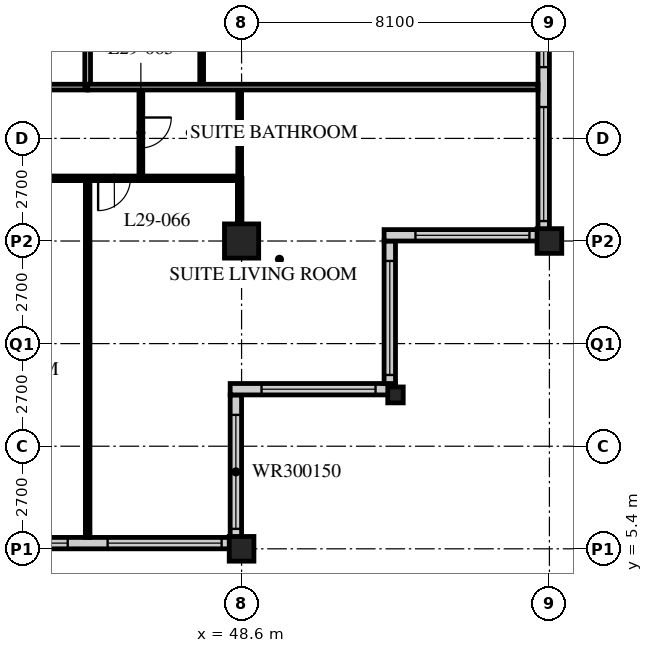
"""IFC4 building model, lengths in metres.
Left out: names, types, materials, properties, quantities, classifications, styles, units other than length and angle.
Written with IfcOpenShell. Run it as: python <this file> out.ifc"""

import sys

from ifc_helpers import new_model, si_unit, direction, frame, frame_2d, origin, origin_2d, place, context, subcontext, project, spatial, rectangle, hollow_rectangle, i_section, extrude, element, fill, save


model = new_model("IFC4")
c1 = context("Model", 3, precision=1e-05, world=origin(), true_north=direction((0.0, 1.0)))
c2 = subcontext(c1, "Body", "Model", "MODEL_VIEW")
j1 = project(units=[si_unit("LENGTHUNIT", "METRE"), si_unit("PLANEANGLEUNIT", "RADIAN")], contexts=[c1])
p1 = place(None, origin())
s1 = spatial("IfcSite", under=j1, at=p1, CompositionType="ELEMENT")
p2 = place(p1, origin())
s2 = spatial("IfcBuilding", under=s1, at=p2, CompositionType="ELEMENT")
p3 = place(p2, frame((0.0, 0.0, 117.0)))
s3 = spatial("IfcBuildingStorey", under=s2, at=p3, CompositionType="ELEMENT", Elevation=117.0)
p4 = place(p3, frame((48.6, 5.4, 0.0), z_axis=(0.0, 0.0, 1.0), x_axis=(1.0, 0.0, 0.0)))
e1 = element("IfcColumn", 1, at=p4, inside=s3, PredefinedType="COLUMN", context=c2, shape_type="SweptSolid", body=[
    extrude(hollow_rectangle(XDim=0.65, YDim=0.65, WallThickness=0.055, at=origin_2d()), origin(), (0.0, 0.0, 1.0), 3.4),
])
p5 = place(p3, frame((48.6, 13.5, 0.0), z_axis=(0.0, 0.0, 1.0), x_axis=(1.0, 0.0, 0.0)))
e2 = element("IfcColumn", 2, at=p5, inside=s3, PredefinedType="COLUMN", context=c2, shape_type="SweptSolid", body=[
    extrude(hollow_rectangle(XDim=0.9, YDim=0.9, WallThickness=0.09, at=origin_2d()), origin(), (0.0, 0.0, 1.0), 3.4),
])
p6 = place(p3, frame((52.65, 9.45, 0.0), z_axis=(0.0, 0.0, 1.0), x_axis=(1.0, 0.0, 0.0)))
e3 = element("IfcColumn", 3, at=p6, inside=s3, PredefinedType="COLUMN", context=c2, shape_type="SweptSolid", body=[
    extrude(i_section(OverallWidth=0.407, OverallDepth=0.419, WebThickness=0.031, FlangeThickness=0.049, FilletRadius=0.015, at=origin_2d()), origin(), (0.0, 0.0, 1.0), 3.4),
])
p7 = place(p3, frame((56.7, 13.5, 0.0), z_axis=(0.0, 0.0, 1.0), x_axis=(1.0, 0.0, 0.0)))
e4 = element("IfcColumn", 4, at=p7, inside=s3, PredefinedType="COLUMN", context=c2, shape_type="SweptSolid", body=[
    extrude(hollow_rectangle(XDim=0.65, YDim=0.65, WallThickness=0.055, at=origin_2d()), origin(), (0.0, 0.0, 1.0), 3.4),
])
p8 = place(p3, frame((8.4, 5.55, 0.0), z_axis=(0.0, 0.0, 1.0), x_axis=(1.0, 0.0, 0.0)))
e5 = element("IfcWall", 5, at=p8, inside=s3, PredefinedType="SOLIDWALL", context=c2, shape_type="SweptSolid", body=[
    extrude(rectangle(XDim=40.2, YDim=0.3, at=frame_2d((20.1, 0.0))), origin(), (0.0, 0.0, 1.0), 3.19),
])
p9 = place(p8, frame((0.225, 0.0, 0.9)))
e6 = element("IfcOpeningElement", 6, at=p9, cuts=e5, PredefinedType="OPENING", context=c2, shape_type="SweptSolid", body=[
    extrude(rectangle(XDim=3.0, YDim=2.0, at=frame_2d((1.5, 1.0))), frame((0.0, 0.16, 0.0), z_axis=(0.0, -1.0, 0.0), x_axis=(1.0, 0.0, 0.0)), (0.0, 0.0, 1.0), 0.32),
])
p10 = place(p8, frame((4.275, 0.0, 0.9)))
e7 = element("IfcOpeningElement", 7, at=p10, cuts=e5, PredefinedType="OPENING", context=c2, shape_type="SweptSolid", body=[
    extrude(rectangle(XDim=3.0, YDim=2.0, at=frame_2d((1.5, 1.0))), frame((0.0, 0.16, 0.0), z_axis=(0.0, -1.0, 0.0), x_axis=(1.0, 0.0, 0.0)), (0.0, 0.0, 1.0), 0.32),
])
p11 = place(p8, frame((8.325, 0.0, 0.9)))
e8 = element("IfcOpeningElement", 8, at=p11, cuts=e5, PredefinedType="OPENING", context=c2, shape_type="SweptSolid", body=[
    extrude(rectangle(XDim=3.0, YDim=2.0, at=frame_2d((1.5, 1.0))), frame((0.0, 0.16, 0.0), z_axis=(0.0, -1.0, 0.0), x_axis=(1.0, 0.0, 0.0)), (0.0, 0.0, 1.0), 0.32),
])
p12 = place(p8, frame((12.375, 0.0, 0.9)))
e9 = element("IfcOpeningElement", 9, at=p12, cuts=e5, PredefinedType="OPENING", context=c2, shape_type="SweptSolid", body=[
    extrude(rectangle(XDim=3.0, YDim=2.0, at=frame_2d((1.5, 1.0))), frame((0.0, 0.16, 0.0), z_axis=(0.0, -1.0, 0.0), x_axis=(1.0, 0.0, 0.0)), (0.0, 0.0, 1.0), 0.32),
])
p13 = place(p8, frame((16.425, 0.0, 0.9)))
e10 = element("IfcOpeningElement", 10, at=p13, cuts=e5, PredefinedType="OPENING", context=c2, shape_type="SweptSolid", body=[
    extrude(rectangle(XDim=3.0, YDim=2.0, at=frame_2d((1.5, 1.0))), frame((0.0, 0.16, 0.0), z_axis=(0.0, -1.0, 0.0), x_axis=(1.0, 0.0, 0.0)), (0.0, 0.0, 1.0), 0.32),
])
p14 = place(p8, frame((20.475, 0.0, 0.9)))
e11 = element("IfcOpeningElement", 11, at=p14, cuts=e5, PredefinedType="OPENING", context=c2, shape_type="SweptSolid", body=[
    extrude(rectangle(XDim=3.0, YDim=2.0, at=frame_2d((1.5, 1.0))), frame((0.0, 0.16, 0.0), z_axis=(0.0, -1.0, 0.0), x_axis=(1.0, 0.0, 0.0)), (0.0, 0.0, 1.0), 0.32),
])
p15 = place(p8, frame((24.525, 0.0, 0.9)))
e12 = element("IfcOpeningElement", 12, at=p15, cuts=e5, PredefinedType="OPENING", context=c2, shape_type="SweptSolid", body=[
    extrude(rectangle(XDim=3.0, YDim=2.0, at=frame_2d((1.5, 1.0))), frame((0.0, 0.16, 0.0), z_axis=(0.0, -1.0, 0.0), x_axis=(1.0, 0.0, 0.0)), (0.0, 0.0, 1.0), 0.32),
])
p16 = place(p8, frame((28.575, 0.0, 0.9)))
e13 = element("IfcOpeningElement", 13, at=p16, cuts=e5, PredefinedType="OPENING", context=c2, shape_type="SweptSolid", body=[
    extrude(rectangle(XDim=3.0, YDim=2.0, at=frame_2d((1.5, 1.0))), frame((0.0, 0.16, 0.0), z_axis=(0.0, -1.0, 0.0), x_axis=(1.0, 0.0, 0.0)), (0.0, 0.0, 1.0), 0.32),
])
p17 = place(p8, frame((32.625, 0.0, 0.9)))
e14 = element("IfcOpeningElement", 14, at=p17, cuts=e5, PredefinedType="OPENING", context=c2, shape_type="SweptSolid", body=[
    extrude(rectangle(XDim=3.0, YDim=2.0, at=frame_2d((1.5, 1.0))), frame((0.0, 0.16, 0.0), z_axis=(0.0, -1.0, 0.0), x_axis=(1.0, 0.0, 0.0)), (0.0, 0.0, 1.0), 0.32),
])
p18 = place(p8, frame((36.675, 0.0, 0.9)))
e15 = element("IfcOpeningElement", 15, at=p18, cuts=e5, PredefinedType="OPENING", context=c2, shape_type="SweptSolid", body=[
    extrude(rectangle(XDim=3.0, YDim=2.0, at=frame_2d((1.5, 1.0))), frame((0.0, 0.16, 0.0), z_axis=(0.0, -1.0, 0.0), x_axis=(1.0, 0.0, 0.0)), (0.0, 0.0, 1.0), 0.32),
])
p19 = place(p3, frame((48.45, 5.7, 0.0), z_axis=(0.0, 0.0, 1.0), x_axis=(0.0, 1.0, 0.0)))
e16 = element("IfcWall", 16, at=p19, inside=s3, PredefinedType="SOLIDWALL", context=c2, shape_type="SweptSolid", body=[
    extrude(rectangle(XDim=3.75, YDim=0.3, at=frame_2d((1.875, 0.0))), origin(), (0.0, 0.0, 1.0), 3.19),
])
p20 = place(p19, frame((0.225, 0.0, 0.9)))
e17 = element("IfcOpeningElement", 17, at=p20, cuts=e16, PredefinedType="OPENING", context=c2, shape_type="SweptSolid", body=[
    extrude(rectangle(XDim=3.0, YDim=1.5, at=frame_2d((1.5, 0.75))), frame((0.0, 0.16, 0.0), z_axis=(0.0, -1.0, 0.0), x_axis=(1.0, 0.0, 0.0)), (0.0, 0.0, 1.0), 0.32),
])
p21 = place(p3, frame((48.3, 9.6, 0.0), z_axis=(0.0, 0.0, 1.0), x_axis=(1.0, 0.0, 0.0)))
e18 = element("IfcWall", 18, at=p21, inside=s3, PredefinedType="SOLIDWALL", context=c2, shape_type="SweptSolid", body=[
    extrude(rectangle(XDim=4.35, YDim=0.3, at=frame_2d((2.175, 0.0))), origin(), (0.0, 0.0, 1.0), 3.19),
])
p22 = place(p21, frame((0.825, 0.0, 0.9)))
e19 = element("IfcOpeningElement", 19, at=p22, cuts=e18, PredefinedType="OPENING", context=c2, shape_type="SweptSolid", body=[
    extrude(rectangle(XDim=3.0, YDim=1.5, at=frame_2d((1.5, 0.75))), frame((0.0, 0.16, 0.0), z_axis=(0.0, -1.0, 0.0), x_axis=(1.0, 0.0, 0.0)), (0.0, 0.0, 1.0), 0.32),
])
p23 = place(p3, frame((52.5, 9.75, 0.0), z_axis=(0.0, 0.0, 1.0), x_axis=(0.0, 1.0, 0.0)))
e20 = element("IfcWall", 20, at=p23, inside=s3, PredefinedType="SOLIDWALL", context=c2, shape_type="SweptSolid", body=[
    extrude(rectangle(XDim=3.75, YDim=0.3, at=frame_2d((1.875, 0.0))), origin(), (0.0, 0.0, 1.0), 3.19),
])
p24 = place(p23, frame((0.225, 0.0, 0.9)))
e21 = element("IfcOpeningElement", 21, at=p24, cuts=e20, PredefinedType="OPENING", context=c2, shape_type="SweptSolid", body=[
    extrude(rectangle(XDim=3.0, YDim=1.5, at=frame_2d((1.5, 0.75))), frame((0.0, 0.16, 0.0), z_axis=(0.0, -1.0, 0.0), x_axis=(1.0, 0.0, 0.0)), (0.0, 0.0, 1.0), 0.32),
])
p25 = place(p3, frame((52.35, 13.65, 0.0), z_axis=(0.0, 0.0, 1.0), x_axis=(1.0, 0.0, 0.0)))
e22 = element("IfcWall", 22, at=p25, inside=s3, PredefinedType="SOLIDWALL", context=c2, shape_type="SweptSolid", body=[
    extrude(rectangle(XDim=4.35, YDim=0.3, at=frame_2d((2.175, 0.0))), origin(), (0.0, 0.0, 1.0), 3.19),
])
p26 = place(p25, frame((0.825, 0.0, 0.9)))
e23 = element("IfcOpeningElement", 23, at=p26, cuts=e22, PredefinedType="OPENING", context=c2, shape_type="SweptSolid", body=[
    extrude(rectangle(XDim=3.0, YDim=1.5, at=frame_2d((1.5, 0.75))), frame((0.0, 0.16, 0.0), z_axis=(0.0, -1.0, 0.0), x_axis=(1.0, 0.0, 0.0)), (0.0, 0.0, 1.0), 0.32),
])
p27 = place(p3, frame((56.55, 13.8, 0.0), z_axis=(0.0, 0.0, 1.0), x_axis=(0.0, 1.0, 0.0)))
e24 = element("IfcWall", 24, at=p27, inside=s3, PredefinedType="SOLIDWALL", context=c2, shape_type="SweptSolid", body=[
    extrude(rectangle(XDim=32.1, YDim=0.3, at=frame_2d((16.05, 0.0))), origin(), (0.0, 0.0, 1.0), 3.19),
])
p28 = place(p27, frame((0.225, 0.0, 0.9)))
e25 = element("IfcOpeningElement", 25, at=p28, cuts=e24, PredefinedType="OPENING", context=c2, shape_type="SweptSolid", body=[
    extrude(rectangle(XDim=3.0, YDim=2.0, at=frame_2d((1.5, 1.0))), frame((0.0, 0.16, 0.0), z_axis=(0.0, -1.0, 0.0), x_axis=(1.0, 0.0, 0.0)), (0.0, 0.0, 1.0), 0.32),
])
p29 = place(p27, frame((4.275, 0.0, 0.9)))
e26 = element("IfcOpeningElement", 26, at=p29, cuts=e24, PredefinedType="OPENING", context=c2, shape_type="SweptSolid", body=[
    extrude(rectangle(XDim=3.0, YDim=2.0, at=frame_2d((1.5, 1.0))), frame((0.0, 0.16, 0.0), z_axis=(0.0, -1.0, 0.0), x_axis=(1.0, 0.0, 0.0)), (0.0, 0.0, 1.0), 0.32),
])
p30 = place(p27, frame((8.325, 0.0, 0.9)))
e27 = element("IfcOpeningElement", 27, at=p30, cuts=e24, PredefinedType="OPENING", context=c2, shape_type="SweptSolid", body=[
    extrude(rectangle(XDim=3.0, YDim=2.0, at=frame_2d((1.5, 1.0))), frame((0.0, 0.16, 0.0), z_axis=(0.0, -1.0, 0.0), x_axis=(1.0, 0.0, 0.0)), (0.0, 0.0, 1.0), 0.32),
])
p31 = place(p27, frame((12.375, 0.0, 0.9)))
e28 = element("IfcOpeningElement", 28, at=p31, cuts=e24, PredefinedType="OPENING", context=c2, shape_type="SweptSolid", body=[
    extrude(rectangle(XDim=3.0, YDim=2.0, at=frame_2d((1.5, 1.0))), frame((0.0, 0.16, 0.0), z_axis=(0.0, -1.0, 0.0), x_axis=(1.0, 0.0, 0.0)), (0.0, 0.0, 1.0), 0.32),
])
p32 = place(p27, frame((16.425, 0.0, 0.9)))
e29 = element("IfcOpeningElement", 29, at=p32, cuts=e24, PredefinedType="OPENING", context=c2, shape_type="SweptSolid", body=[
    extrude(rectangle(XDim=3.0, YDim=2.0, at=frame_2d((1.5, 1.0))), frame((0.0, 0.16, 0.0), z_axis=(0.0, -1.0, 0.0), x_axis=(1.0, 0.0, 0.0)), (0.0, 0.0, 1.0), 0.32),
])
p33 = place(p27, frame((20.475, 0.0, 0.9)))
e30 = element("IfcOpeningElement", 30, at=p33, cuts=e24, PredefinedType="OPENING", context=c2, shape_type="SweptSolid", body=[
    extrude(rectangle(XDim=3.0, YDim=2.0, at=frame_2d((1.5, 1.0))), frame((0.0, 0.16, 0.0), z_axis=(0.0, -1.0, 0.0), x_axis=(1.0, 0.0, 0.0)), (0.0, 0.0, 1.0), 0.32),
])
p34 = place(p27, frame((24.525, 0.0, 0.9)))
e31 = element("IfcOpeningElement", 31, at=p34, cuts=e24, PredefinedType="OPENING", context=c2, shape_type="SweptSolid", body=[
    extrude(rectangle(XDim=3.0, YDim=2.0, at=frame_2d((1.5, 1.0))), frame((0.0, 0.16, 0.0), z_axis=(0.0, -1.0, 0.0), x_axis=(1.0, 0.0, 0.0)), (0.0, 0.0, 1.0), 0.32),
])
p35 = place(p27, frame((28.575, 0.0, 0.9)))
e32 = element("IfcOpeningElement", 32, at=p35, cuts=e24, PredefinedType="OPENING", context=c2, shape_type="SweptSolid", body=[
    extrude(rectangle(XDim=3.0, YDim=2.0, at=frame_2d((1.5, 1.0))), frame((0.0, 0.16, 0.0), z_axis=(0.0, -1.0, 0.0), x_axis=(1.0, 0.0, 0.0)), (0.0, 0.0, 1.0), 0.32),
])
p36 = place(p3, frame((12.15, 17.55, 0.0), z_axis=(0.0, 0.0, 1.0), x_axis=(1.0, 0.0, 0.0)))
e33 = element("IfcWall", 33, at=p36, inside=s3, PredefinedType="PARTITIONING", context=c2, shape_type="SweptSolid", body=[
    extrude(rectangle(XDim=32.4, YDim=0.15, at=frame_2d((16.2, 0.0))), origin(), (0.0, 0.0, 1.0), 3.19),
])
p37 = place(p36, frame((5.95, 0.0, 0.0)))
e34 = element("IfcOpeningElement", 34, at=p37, cuts=e33, PredefinedType="OPENING", context=c2, shape_type="SweptSolid", body=[
    extrude(rectangle(XDim=1.0, YDim=2.1, at=frame_2d((0.5, 1.05))), frame((0.0, 0.085, 0.0), z_axis=(0.0, -1.0, 0.0), x_axis=(1.0, 0.0, 0.0)), (0.0, 0.0, 1.0), 0.17),
])
p38 = place(p36, frame((17.725, 0.0, 0.0)))
e35 = element("IfcOpeningElement", 35, at=p38, cuts=e33, PredefinedType="OPENING", context=c2, shape_type="SweptSolid", body=[
    extrude(rectangle(XDim=1.0, YDim=2.1, at=frame_2d((0.5, 1.05))), frame((0.0, 0.085, 0.0), z_axis=(0.0, -1.0, 0.0), x_axis=(1.0, 0.0, 0.0)), (0.0, 0.0, 1.0), 0.17),
])
p39 = place(p36, frame((26.75, 0.0, 0.0)))
e36 = element("IfcOpeningElement", 36, at=p39, cuts=e33, PredefinedType="OPENING", context=c2, shape_type="SweptSolid", body=[
    extrude(rectangle(XDim=1.0, YDim=2.1, at=frame_2d((0.5, 1.05))), frame((0.0, 0.085, 0.0), z_axis=(0.0, -1.0, 0.0), x_axis=(1.0, 0.0, 0.0)), (0.0, 0.0, 1.0), 0.17),
])
p40 = place(p36, frame((1.525, 0.0, 0.0)))
e37 = element("IfcOpeningElement", 37, at=p40, cuts=e33, PredefinedType="OPENING", context=c2, shape_type="SweptSolid", body=[
    extrude(rectangle(XDim=1.0, YDim=2.1, at=frame_2d((0.5, 1.05))), frame((0.0, 0.085, 0.0), z_axis=(0.0, -1.0, 0.0), x_axis=(1.0, 0.0, 0.0)), (0.0, 0.0, 1.0), 0.17),
])
p41 = place(p36, frame((29.875, 0.0, 0.0)))
e38 = element("IfcOpeningElement", 38, at=p41, cuts=e33, PredefinedType="OPENING", context=c2, shape_type="SweptSolid", body=[
    extrude(rectangle(XDim=1.0, YDim=2.1, at=frame_2d((0.5, 1.05))), frame((0.0, 0.085, 0.0), z_axis=(0.0, -1.0, 0.0), x_axis=(1.0, 0.0, 0.0)), (0.0, 0.0, 1.0), 0.17),
])
p42 = place(p3, frame((44.55, 17.55, 0.0), z_axis=(0.0, 0.0, 1.0), x_axis=(0.0, 1.0, 0.0)))
e39 = element("IfcWall", 39, at=p42, inside=s3, PredefinedType="PARTITIONING", context=c2, shape_type="SweptSolid", body=[
    extrude(rectangle(XDim=28.35, YDim=0.15, at=frame_2d((14.175, 0.0))), origin(), (0.0, 0.0, 1.0), 3.19),
])
p43 = place(p42, frame((2.75, 0.0, 0.0)))
e40 = element("IfcOpeningElement", 40, at=p43, cuts=e39, PredefinedType="OPENING", context=c2, shape_type="SweptSolid", body=[
    extrude(rectangle(XDim=1.0, YDim=2.1, at=frame_2d((0.5, 1.05))), frame((0.0, 0.085, 0.0), z_axis=(0.0, -1.0, 0.0), x_axis=(1.0, 0.0, 0.0)), (0.0, 0.0, 1.0), 0.17),
])
p44 = place(p42, frame((6.5, 0.0, 0.0)))
e41 = element("IfcOpeningElement", 41, at=p44, cuts=e39, PredefinedType="OPENING", context=c2, shape_type="SweptSolid", body=[
    extrude(rectangle(XDim=1.0, YDim=2.1, at=frame_2d((0.5, 1.05))), frame((0.0, 0.085, 0.0), z_axis=(0.0, -1.0, 0.0), x_axis=(1.0, 0.0, 0.0)), (0.0, 0.0, 1.0), 0.17),
])
p45 = place(p42, frame((10.0, 0.0, 0.0)))
e42 = element("IfcOpeningElement", 42, at=p45, cuts=e39, PredefinedType="OPENING", context=c2, shape_type="SweptSolid", body=[
    extrude(rectangle(XDim=1.0, YDim=2.1, at=frame_2d((0.5, 1.05))), frame((0.0, 0.085, 0.0), z_axis=(0.0, -1.0, 0.0), x_axis=(1.0, 0.0, 0.0)), (0.0, 0.0, 1.0), 0.17),
])
p46 = place(p42, frame((21.65, 0.0, 0.0)))
e43 = element("IfcOpeningElement", 43, at=p46, cuts=e39, PredefinedType="OPENING", context=c2, shape_type="SweptSolid", body=[
    extrude(rectangle(XDim=1.0, YDim=2.1, at=frame_2d((0.5, 1.05))), frame((0.0, 0.085, 0.0), z_axis=(0.0, -1.0, 0.0), x_axis=(1.0, 0.0, 0.0)), (0.0, 0.0, 1.0), 0.17),
])
p47 = place(p42, frame((26.75, 0.0, 0.0)))
e44 = element("IfcOpeningElement", 44, at=p47, cuts=e39, PredefinedType="OPENING", context=c2, shape_type="SweptSolid", body=[
    extrude(rectangle(XDim=1.0, YDim=2.1, at=frame_2d((0.5, 1.05))), frame((0.0, 0.085, 0.0), z_axis=(0.0, -1.0, 0.0), x_axis=(1.0, 0.0, 0.0)), (0.0, 0.0, 1.0), 0.17),
])
p48 = place(p3, frame((47.55, 17.55, 0.0), z_axis=(0.0, 0.0, 1.0), x_axis=(0.0, 1.0, 0.0)))
e45 = element("IfcWall", 45, at=p48, inside=s3, PredefinedType="PARTITIONING", context=c2, shape_type="SweptSolid", body=[
    extrude(rectangle(XDim=2.6, YDim=0.1, at=frame_2d((1.3, 0.0))), origin(), (0.0, 0.0, 1.0), 3.19),
])
p49 = place(p3, frame((40.5, 15.15, 0.0), z_axis=(0.0, 0.0, 1.0), x_axis=(1.0, 0.0, 0.0)))
e46 = element("IfcWall", 46, at=p49, inside=s3, PredefinedType="PARTITIONING", context=c2, shape_type="SweptSolid", body=[
    extrude(rectangle(XDim=8.05, YDim=0.12, at=frame_2d((4.025, 0.0))), origin(), (0.0, 0.0, 1.0), 3.19),
])
p50 = place(p49, frame((0.475, 0.0, 0.0)))
e47 = element("IfcOpeningElement", 47, at=p50, cuts=e46, PredefinedType="OPENING", context=c2, shape_type="SweptSolid", body=[
    extrude(rectangle(XDim=0.85, YDim=2.1, at=frame_2d((0.425, 1.05))), frame((0.0, 0.07, 0.0), z_axis=(0.0, -1.0, 0.0), x_axis=(1.0, 0.0, 0.0)), (0.0, 0.0, 1.0), 0.14),
])
p51 = place(p49, frame((4.325, 0.0, 0.0)))
e48 = element("IfcOpeningElement", 48, at=p51, cuts=e46, PredefinedType="OPENING", context=c2, shape_type="SweptSolid", body=[
    extrude(rectangle(XDim=0.85, YDim=2.1, at=frame_2d((0.425, 1.05))), frame((0.0, 0.07, 0.0), z_axis=(0.0, -1.0, 0.0), x_axis=(1.0, 0.0, 0.0)), (0.0, 0.0, 1.0), 0.14),
])
p52 = place(p3, frame((45.95, 17.55, 0.0), z_axis=(0.0, 0.0, 1.0), x_axis=(0.0, -1.0, 0.0)))
e49 = element("IfcWall", 49, at=p52, inside=s3, PredefinedType="PARTITIONING", context=c2, shape_type="SweptSolid", body=[
    extrude(rectangle(XDim=2.4, YDim=0.1, at=frame_2d((1.2, 0.0))), origin(), (0.0, 0.0, 1.0), 3.19),
])
p53 = place(p52, frame((0.8, 0.0, 0.0)))
e50 = element("IfcOpeningElement", 50, at=p53, cuts=e49, PredefinedType="OPENING", context=c2, shape_type="SweptSolid", body=[
    extrude(rectangle(XDim=0.8, YDim=2.1, at=frame_2d((0.4, 1.05))), frame((0.0, 0.06, 0.0), z_axis=(0.0, -1.0, 0.0), x_axis=(1.0, 0.0, 0.0)), (0.0, 0.0, 1.0), 0.12),
])
p54 = place(p3, frame((48.55, 17.55, 0.0), z_axis=(0.0, 0.0, 1.0), x_axis=(0.0, -1.0, 0.0)))
e51 = element("IfcWall", 51, at=p54, inside=s3, PredefinedType="PARTITIONING", context=c2, shape_type="SweptSolid", body=[
    extrude(rectangle(XDim=2.4, YDim=0.1, at=frame_2d((1.2, 0.0))), origin(), (0.0, 0.0, 1.0), 2.578),
])
p55 = place(p3, frame((44.55, 15.15, 0.0), z_axis=(0.0, 0.0, 1.0), x_axis=(0.0, -1.0, 0.0)))
e52 = element("IfcWall", 52, at=p55, inside=s3, PredefinedType="PARTITIONING", context=c2, shape_type="SweptSolid", body=[
    extrude(rectangle(XDim=9.45, YDim=0.12, at=frame_2d((4.725, 0.0))), origin(), (0.0, 0.0, 1.0), 3.19),
])
p56 = place(p3, frame((44.55, 17.55, 0.0), z_axis=(0.0, 0.0, 1.0), x_axis=(1.0, 0.0, 0.0)))
e53 = element("IfcWall", 53, at=p56, inside=s3, PredefinedType="PARTITIONING", context=c2, shape_type="SweptSolid", body=[
    extrude(rectangle(XDim=11.85, YDim=0.15, at=frame_2d((5.925, 0.0))), origin(), (0.0, 0.0, 1.0), 3.19),
])
p57 = place(p3, frame((48.55, 15.15, 0.0), z_axis=(0.0, 0.0, 1.0), x_axis=(0.0, -1.0, 0.0)))
e54 = element("IfcWall", 54, at=p57, inside=s3, PredefinedType="PARTITIONING", context=c2, shape_type="SweptSolid", body=[
    extrude(rectangle(XDim=1.2, YDim=0.12, at=frame_2d((0.6, 0.0))), origin(), (0.0, 0.0, 1.0), 2.578),
])
p58 = place(p17, origin())
e55 = element("IfcWindow", 55, at=p58, inside=s3, PartitioningType="SINGLE_PANEL", PredefinedType="WINDOW", context=c2, shape_type="SweptSolid", body=[
    extrude(rectangle(XDim=3.0, YDim=2.0, at=frame_2d((1.5, 1.0))), frame((0.0, 0.03, 0.0), z_axis=(0.0, -1.0, 0.0), x_axis=(1.0, 0.0, 0.0)), (0.0, 0.0, 1.0), 0.06),
])
fill(e14, e55)
p59 = place(p18, origin())
e56 = element("IfcWindow", 56, at=p59, inside=s3, PartitioningType="SINGLE_PANEL", PredefinedType="WINDOW", context=c2, shape_type="SweptSolid", body=[
    extrude(rectangle(XDim=3.0, YDim=2.0, at=frame_2d((1.5, 1.0))), frame((0.0, 0.03, 0.0), z_axis=(0.0, -1.0, 0.0), x_axis=(1.0, 0.0, 0.0)), (0.0, 0.0, 1.0), 0.06),
])
fill(e15, e56)
p60 = place(p20, origin())
e57 = element("IfcWindow", 57, at=p60, inside=s3, PartitioningType="SINGLE_PANEL", PredefinedType="WINDOW", context=c2, shape_type="SweptSolid", body=[
    extrude(rectangle(XDim=3.0, YDim=1.5, at=frame_2d((1.5, 0.75))), frame((0.0, 0.03, 0.0), z_axis=(0.0, -1.0, 0.0), x_axis=(1.0, 0.0, 0.0)), (0.0, 0.0, 1.0), 0.06),
])
fill(e17, e57)
p61 = place(p22, origin())
e58 = element("IfcWindow", 58, at=p61, inside=s3, PartitioningType="SINGLE_PANEL", PredefinedType="WINDOW", context=c2, shape_type="SweptSolid", body=[
    extrude(rectangle(XDim=3.0, YDim=1.5, at=frame_2d((1.5, 0.75))), frame((0.0, 0.03, 0.0), z_axis=(0.0, -1.0, 0.0), x_axis=(1.0, 0.0, 0.0)), (0.0, 0.0, 1.0), 0.06),
])
fill(e19, e58)
p62 = place(p24, origin())
e59 = element("IfcWindow", 59, at=p62, inside=s3, PartitioningType="SINGLE_PANEL", PredefinedType="WINDOW", context=c2, shape_type="SweptSolid", body=[
    extrude(rectangle(XDim=3.0, YDim=1.5, at=frame_2d((1.5, 0.75))), frame((0.0, 0.03, 0.0), z_axis=(0.0, -1.0, 0.0), x_axis=(1.0, 0.0, 0.0)), (0.0, 0.0, 1.0), 0.06),
])
fill(e21, e59)
p63 = place(p26, origin())
e60 = element("IfcWindow", 60, at=p63, inside=s3, PartitioningType="SINGLE_PANEL", PredefinedType="WINDOW", context=c2, shape_type="SweptSolid", body=[
    extrude(rectangle(XDim=3.0, YDim=1.5, at=frame_2d((1.5, 0.75))), frame((0.0, 0.03, 0.0), z_axis=(0.0, -1.0, 0.0), x_axis=(1.0, 0.0, 0.0)), (0.0, 0.0, 1.0), 0.06),
])
fill(e23, e60)
p64 = place(p28, origin())
e61 = element("IfcWindow", 61, at=p64, inside=s3, PartitioningType="SINGLE_PANEL", PredefinedType="WINDOW", context=c2, shape_type="SweptSolid", body=[
    extrude(rectangle(XDim=3.0, YDim=2.0, at=frame_2d((1.5, 1.0))), frame((0.0, 0.03, 0.0), z_axis=(0.0, -1.0, 0.0), x_axis=(1.0, 0.0, 0.0)), (0.0, 0.0, 1.0), 0.06),
])
fill(e25, e61)
p65 = place(p29, origin())
e62 = element("IfcWindow", 62, at=p65, inside=s3, PartitioningType="SINGLE_PANEL", PredefinedType="WINDOW", context=c2, shape_type="SweptSolid", body=[
    extrude(rectangle(XDim=3.0, YDim=2.0, at=frame_2d((1.5, 1.0))), frame((0.0, 0.03, 0.0), z_axis=(0.0, -1.0, 0.0), x_axis=(1.0, 0.0, 0.0)), (0.0, 0.0, 1.0), 0.06),
])
fill(e26, e62)
p66 = place(p53, origin())
e63 = element("IfcDoor", 63, at=p66, inside=s3, OperationType="SINGLE_SWING_LEFT", PredefinedType="DOOR", context=c2, shape_type="SweptSolid", body=[
    extrude(rectangle(XDim=0.8, YDim=2.1, at=frame_2d((0.4, 1.05))), frame((0.0, 0.025, 0.0), z_axis=(0.0, -1.0, 0.0), x_axis=(1.0, 0.0, 0.0)), (0.0, 0.0, 1.0), 0.05),
])
fill(e50, e63)
p67 = place(p51, origin())
e64 = element("IfcDoor", 64, at=p67, inside=s3, OperationType="SINGLE_SWING_RIGHT", PredefinedType="DOOR", context=c2, shape_type="SweptSolid", body=[
    extrude(rectangle(XDim=0.85, YDim=2.1, at=frame_2d((0.425, 1.05))), frame((0.0, 0.025, 0.0), z_axis=(0.0, -1.0, 0.0), x_axis=(1.0, 0.0, 0.0)), (0.0, 0.0, 1.0), 0.05),
])
fill(e48, e64)
save(model, sys.argv[1])
